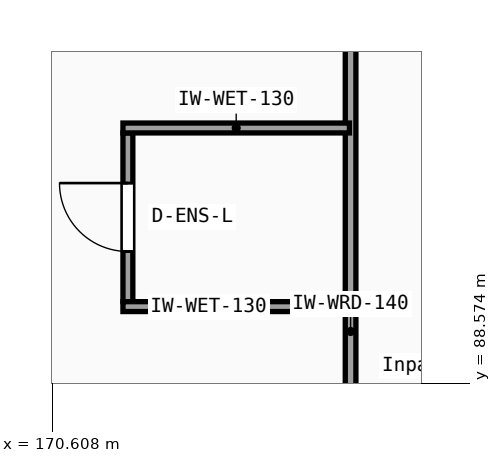
"""IFC4 building model, lengths in metres.
Left out: names, types, materials, properties, quantities, classifications, styles, units other than length and angle.
Written with IfcOpenShell. Run it as: python <this file> out.ifc"""

import sys

from ifc_helpers import new_model, si_unit, direction, frame, frame_2d, origin, place, context, subcontext, project, spatial, rectangle, extrude, element, fill, save


model = new_model("IFC4")
c1 = context("Model", 3, precision=1e-05, world=origin(), true_north=direction((0.0, 1.0)))
c2 = subcontext(c1, "Body", "Model", "MODEL_VIEW")
j1 = project(units=[si_unit("LENGTHUNIT", "METRE"), si_unit("PLANEANGLEUNIT", "RADIAN")], contexts=[c1])
p1 = place(None, origin())
s1 = spatial("IfcSite", under=j1, at=p1, CompositionType="ELEMENT")
p2 = place(p1, origin())
s2 = spatial("IfcBuilding", under=s1, at=p2, CompositionType="ELEMENT")
p3 = place(p2, frame((0.0, 0.0, 31.05)))
s3 = spatial("IfcBuildingStorey", under=s2, at=p3, CompositionType="ELEMENT", Elevation=31.05)
p4 = place(p3, frame((174.533, 82.49, 0.0), z_axis=(0.0, 0.0, 1.0), x_axis=(0.0, 1.0, 0.0)))
e1 = element("IfcWall", 1, at=p4, inside=s3, PredefinedType="PARTITIONING", context=c2, shape_type="SweptSolid", body=[
    extrude(rectangle(XDim=12.025, YDim=0.14, at=frame_2d((6.012, 0.0))), origin(), (0.0, 0.0, 1.0), 3.34),
])
p5 = place(p3, frame((171.603, 89.65, 0.0), z_axis=(0.0, 0.0, 1.0), x_axis=(0.0, 1.0, 0.0)))
e2 = element("IfcWall", 2, at=p5, inside=s3, PredefinedType="PARTITIONING", context=c2, shape_type="SweptSolid", body=[
    extrude(rectangle(XDim=2.22, YDim=0.13, at=frame_2d((1.11, 0.0))), origin(), (0.0, 0.0, 1.0), 3.77),
])
p6 = place(p5, frame((0.66, 0.0, 0.0)))
e3 = element("IfcOpeningElement", 3, at=p6, cuts=e2, PredefinedType="OPENING", context=c2, shape_type="SweptSolid", body=[
    extrude(rectangle(XDim=0.9, YDim=2.1, at=frame_2d((0.45, 1.05))), frame((0.0, 0.075, 0.0), z_axis=(0.0, -1.0, 0.0), x_axis=(1.0, 0.0, 0.0)), (0.0, 0.0, 1.0), 0.15),
])
for number, where, z_axis, x_axis in (
    (4, (171.538, 89.585, 0.0), (0.0, 0.0, 1.0), (1.0, 0.0, 0.0)),
    (5, (171.538, 91.935, 0.0), (0.0, 0.0, 1.0), (1.0, 0.0, 0.0)),
):
    element("IfcWall", number, at=place(p3, frame(where, z_axis=z_axis, x_axis=x_axis)), inside=s3, PredefinedType="PARTITIONING", context=c2, shape_type="SweptSolid", body=[
        extrude(rectangle(XDim=2.98, YDim=0.13, at=frame_2d((1.49, 0.0))), origin(), (0.0, 0.0, 1.0), 3.77),
    ])
p7 = place(p6, origin())
e6 = element("IfcDoor", 6, at=p7, inside=s3, OperationType="SINGLE_SWING_RIGHT", PredefinedType="DOOR", context=c2, shape_type="SweptSolid", body=[
    extrude(rectangle(XDim=0.9, YDim=2.1, at=frame_2d((0.45, 1.05))), frame((0.0, 0.025, 0.0), z_axis=(0.0, -1.0, 0.0), x_axis=(1.0, 0.0, 0.0)), (0.0, 0.0, 1.0), 0.05),
])
fill(e3, e6)
save(model, sys.argv[1])
